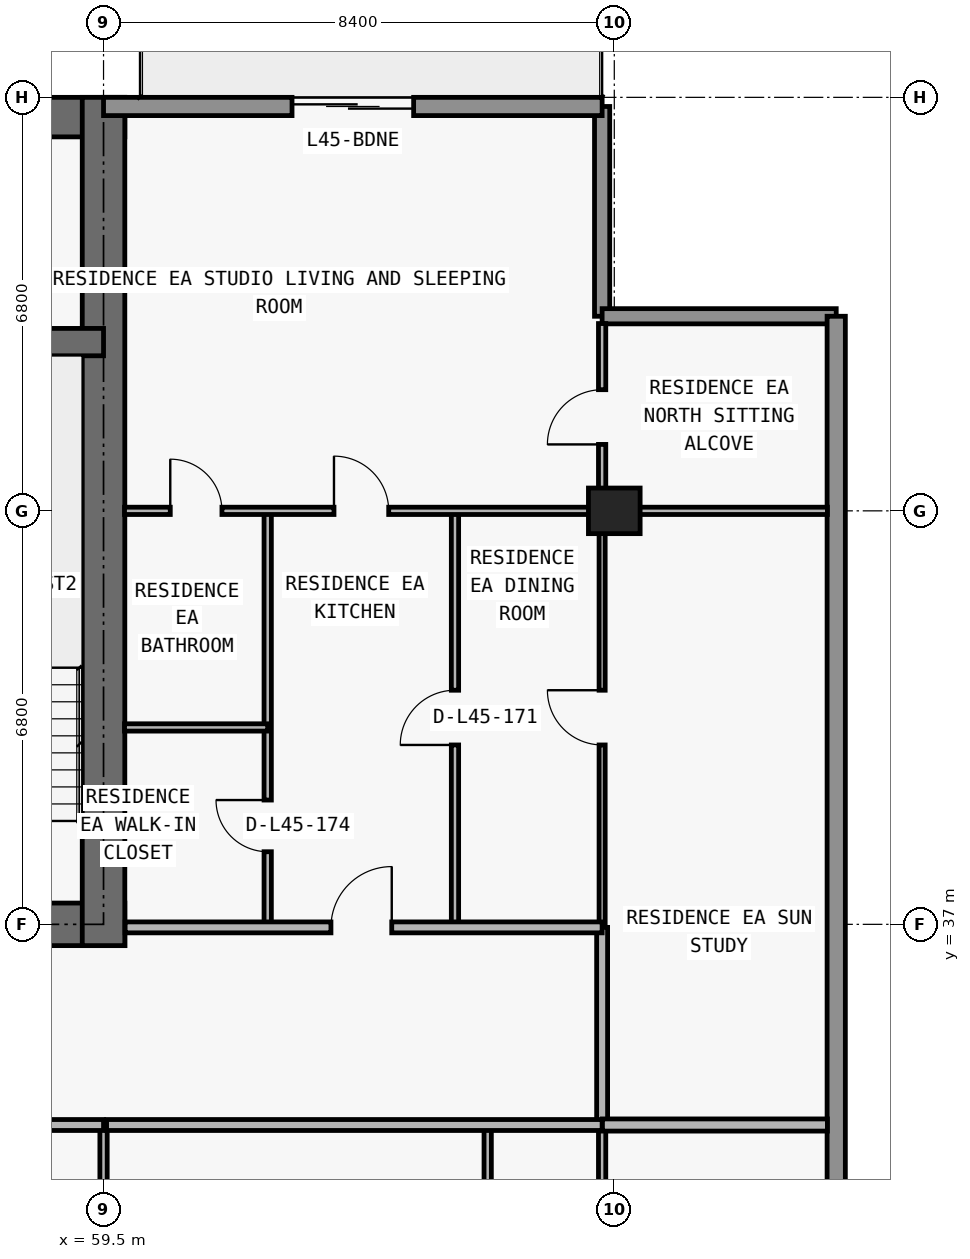
"""IFC4 building model, lengths in metres.
Left out: names, types, materials, properties, quantities, classifications, styles, units other than length and angle.
Written with IfcOpenShell. Run it as: python <this file> out.ifc"""

import sys

from ifc_helpers import new_model, si_unit, direction, frame, frame_2d, origin, origin_2d, place, context, subcontext, project, spatial, rectangle, extrude, element, fill, save


model = new_model("IFC4")
c1 = context("Model", 3, precision=1e-05, world=origin(), true_north=direction((0.0, 1.0)))
c2 = subcontext(c1, "Body", "Model", "MODEL_VIEW")
j1 = project(units=[si_unit("LENGTHUNIT", "METRE"), si_unit("PLANEANGLEUNIT", "RADIAN")], contexts=[c1])
p1 = place(None, origin())
s1 = spatial("IfcSite", under=j1, at=p1, CompositionType="ELEMENT")
p2 = place(p1, origin())
s2 = spatial("IfcBuilding", under=s1, at=p2, CompositionType="ELEMENT")
p3 = place(p2, frame((0.0, 0.0, 163.8)))
s3 = spatial("IfcBuildingStorey", under=s2, at=p3, CompositionType="ELEMENT", Elevation=163.8)
p4 = place(p3, frame((67.9, 43.8, 0.0), z_axis=(0.0, 0.0, 1.0), x_axis=(1.0, 0.0, 0.0)))
e1 = element("IfcColumn", 1, at=p4, inside=s3, PredefinedType="COLUMN", context=c2, shape_type="SweptSolid", body=[
    extrude(rectangle(XDim=0.85, YDim=0.75, at=origin_2d()), origin(), (0.0, 0.0, 1.0), 3.05),
])
p5 = place(p3, frame((17.95, 37.0, 0.0), z_axis=(0.0, 0.0, 1.0), x_axis=(1.0, 0.0, 0.0)))
e2 = element("IfcWall", 2, at=p5, inside=s3, PredefinedType="SHEAR", context=c2, shape_type="SweptSolid", body=[
    extrude(rectangle(XDim=41.9, YDim=0.7, at=frame_2d((20.95, 0.0))), origin(), (0.0, 0.0, 1.0), 3.05),
])
p6 = place(p5, frame((14.35, 0.0, 0.0)))
e3 = element("IfcOpeningElement", 3, at=p6, cuts=e2, PredefinedType="OPENING", context=c2, shape_type="SweptSolid", body=[
    extrude(rectangle(XDim=1.1, YDim=2.15, at=frame_2d((0.55, 1.075))), frame((0.0, 0.36, 0.0), z_axis=(0.0, -1.0, 0.0), x_axis=(1.0, 0.0, 0.0)), (0.0, 0.0, 1.0), 0.72),
])
p7 = place(p5, frame((6.2, 0.0, 0.0)))
e4 = element("IfcOpeningElement", 4, at=p7, cuts=e2, PredefinedType="OPENING", context=c2, shape_type="SweptSolid", body=[
    extrude(rectangle(XDim=1.05, YDim=2.15, at=frame_2d((0.525, 1.075))), frame((0.0, 0.36, 0.0), z_axis=(0.0, -1.0, 0.0), x_axis=(1.0, 0.0, 0.0)), (0.0, 0.0, 1.0), 0.72),
])
p8 = place(p5, frame((34.7, 0.0, 0.0)))
e5 = element("IfcOpeningElement", 5, at=p8, cuts=e2, PredefinedType="OPENING", context=c2, shape_type="SweptSolid", body=[
    extrude(rectangle(XDim=1.05, YDim=2.15, at=frame_2d((0.525, 1.075))), frame((0.0, 0.36, 0.0), z_axis=(0.0, -1.0, 0.0), x_axis=(1.0, 0.0, 0.0)), (0.0, 0.0, 1.0), 0.72),
])
p9 = place(p5, frame((10.812, 0.0, 0.0)))
e6 = element("IfcOpeningElement", 6, at=p9, cuts=e2, PredefinedType="OPENING", context=c2, shape_type="SweptSolid", body=[
    extrude(rectangle(XDim=1.05, YDim=2.15, at=frame_2d((0.525, 1.075))), frame((0.0, 0.36, 0.0), z_axis=(0.0, -1.0, 0.0), x_axis=(1.0, 0.0, 0.0)), (0.0, 0.0, 1.0), 0.72),
])
p10 = place(p5, frame((24.05, 0.0, 0.0)))
e7 = element("IfcOpeningElement", 7, at=p10, cuts=e2, PredefinedType="OPENING", context=c2, shape_type="SweptSolid", body=[
    extrude(rectangle(XDim=1.05, YDim=2.15, at=frame_2d((0.525, 1.075))), frame((0.0, 0.36, 0.0), z_axis=(0.0, -1.0, 0.0), x_axis=(1.0, 0.0, 0.0)), (0.0, 0.0, 1.0), 0.72),
])
p11 = place(p3, frame((17.95, 50.275, 0.0), z_axis=(0.0, 0.0, 1.0), x_axis=(1.0, 0.0, 0.0)))
e8 = element("IfcWall", 8, at=p11, inside=s3, PredefinedType="SHEAR", context=c2, shape_type="SweptSolid", body=[
    extrude(rectangle(XDim=41.9, YDim=0.65, at=frame_2d((20.95, 0.0))), origin(), (0.0, 0.0, 1.0), 3.05),
])
p12 = place(p3, frame((59.5, 36.65, 0.0), z_axis=(0.0, 0.0, 1.0), x_axis=(0.0, 1.0, 0.0)))
e9 = element("IfcWall", 9, at=p12, inside=s3, PredefinedType="SHEAR", context=c2, shape_type="SweptSolid", body=[
    extrude(rectangle(XDim=13.95, YDim=0.7, at=frame_2d((6.975, 0.0))), origin(), (0.0, 0.0, 1.0), 3.05),
])
p13 = place(p3, frame((18.3, 46.575, 0.0), z_axis=(0.0, 0.0, 1.0), x_axis=(1.0, 0.0, 0.0)))
e10 = element("IfcWall", 10, at=p13, inside=s3, PredefinedType="SHEAR", context=c2, shape_type="SweptSolid", body=[
    extrude(rectangle(XDim=41.2, YDim=0.45, at=frame_2d((20.6, 0.0))), origin(), (0.0, 0.0, 1.0), 3.05),
])
p14 = place(p13, frame((7.6, 0.0, 0.0)))
e11 = element("IfcOpeningElement", 11, at=p14, cuts=e10, PredefinedType="OPENING", context=c2, shape_type="SweptSolid", body=[
    extrude(rectangle(XDim=1.0, YDim=2.2, at=frame_2d((0.5, 1.1))), frame((0.0, 0.235, 0.0), z_axis=(0.0, -1.0, 0.0), x_axis=(1.0, 0.0, 0.0)), (0.0, 0.0, 1.0), 0.47),
])
p15 = place(p13, frame((32.625, 0.0, 0.0)))
e12 = element("IfcOpeningElement", 12, at=p15, cuts=e10, PredefinedType="OPENING", context=c2, shape_type="SweptSolid", body=[
    extrude(rectangle(XDim=1.05, YDim=2.15, at=frame_2d((0.525, 1.075))), frame((0.0, 0.235, 0.0), z_axis=(0.0, -1.0, 0.0), x_axis=(1.0, 0.0, 0.0)), (0.0, 0.0, 1.0), 0.47),
])
p16 = place(p3, frame((67.7, 50.45, 0.0), z_axis=(0.0, 0.0, 1.0), x_axis=(0.0, -1.0, 0.0)))
e13 = element("IfcWall", 13, at=p16, inside=s3, PredefinedType="ELEMENTEDWALL", context=c2, shape_type="SweptSolid", body=[
    extrude(rectangle(XDim=3.45, YDim=0.25, at=frame_2d((1.725, 0.0))), origin(), (0.0, 0.0, 1.0), 3.05),
])
p17 = place(p3, frame((67.7, 47.0, 0.0), z_axis=(0.0, 0.0, 1.0), x_axis=(1.0, 0.0, 0.0)))
e14 = element("IfcWall", 14, at=p17, inside=s3, PredefinedType="ELEMENTEDWALL", context=c2, shape_type="SweptSolid", body=[
    extrude(rectangle(XDim=3.85, YDim=0.25, at=frame_2d((1.925, 0.0))), origin(), (0.0, 0.0, 1.0), 3.05),
])
p18 = place(p3, frame((71.55, 47.0, 0.0), z_axis=(0.0, 0.0, 1.0), x_axis=(0.0, -1.0, 0.0)))
e15 = element("IfcWall", 15, at=p18, inside=s3, PredefinedType="STANDARD", context=c2, shape_type="SweptSolid", body=[
    extrude(rectangle(XDim=17.9, YDim=0.3, at=frame_2d((8.95, 0.0))), origin(), (0.0, 0.0, 1.0), 3.05),
])
p19 = place(p3, frame((59.5, 50.45, 0.0), z_axis=(0.0, 0.0, 1.0), x_axis=(1.0, 0.0, 0.0)))
e16 = element("IfcWall", 16, at=p19, inside=s3, PredefinedType="STANDARD", context=c2, shape_type="SweptSolid", body=[
    extrude(rectangle(XDim=8.2, YDim=0.3, at=frame_2d((4.1, 0.0))), origin(), (0.0, 0.0, 1.0), 3.05),
])
p20 = place(p19, frame((3.1, 0.0, 0.0)))
e17 = element("IfcOpeningElement", 17, at=p20, cuts=e16, PredefinedType="OPENING", context=c2, shape_type="SweptSolid", body=[
    extrude(rectangle(XDim=2.0, YDim=2.3, at=frame_2d((1.0, 1.15))), frame((0.0, 0.16, 0.0), z_axis=(0.0, -1.0, 0.0), x_axis=(1.0, 0.0, 0.0)), (0.0, 0.0, 1.0), 0.32),
])
p21 = place(p3, frame((59.5, 29.44, 0.0), z_axis=(0.0, 0.0, 1.0), x_axis=(0.0, 1.0, 0.0)))
e18 = element("IfcWall", 18, at=p21, inside=s3, PredefinedType="PARTITIONING", context=c2, shape_type="SweptSolid", body=[
    extrude(rectangle(XDim=4.26, YDim=0.12, at=frame_2d((2.13, 0.0))), origin(), (0.0, 0.0, 1.0), 2.263),
])
p22 = place(p3, frame((62.2, 37.0, 0.0), z_axis=(0.0, 0.0, 1.0), x_axis=(0.0, 1.0, 0.0)))
e19 = element("IfcWall", 19, at=p22, inside=s3, PredefinedType="PARTITIONING", context=c2, shape_type="SweptSolid", body=[
    extrude(rectangle(XDim=6.8, YDim=0.12, at=frame_2d((3.4, 0.0))), origin(), (0.0, 0.0, 1.0), 3.05),
])
p23 = place(p22, frame((1.194, 0.0, 0.0)))
e20 = element("IfcOpeningElement", 20, at=p23, cuts=e19, PredefinedType="OPENING", context=c2, shape_type="SweptSolid", body=[
    extrude(rectangle(XDim=0.85, YDim=2.1, at=frame_2d((0.425, 1.05))), frame((0.0, 0.07, 0.0), z_axis=(0.0, -1.0, 0.0), x_axis=(1.0, 0.0, 0.0)), (0.0, 0.0, 1.0), 0.14),
])
p24 = place(p3, frame((65.28, 37.0, 0.0), z_axis=(0.0, 0.0, 1.0), x_axis=(0.0, 1.0, 0.0)))
e21 = element("IfcWall", 21, at=p24, inside=s3, PredefinedType="PARTITIONING", context=c2, shape_type="SweptSolid", body=[
    extrude(rectangle(XDim=6.8, YDim=0.12, at=frame_2d((3.4, 0.0))), origin(), (0.0, 0.0, 1.0), 3.05),
])
p25 = place(p24, frame((2.95, 0.0, 0.0)))
e22 = element("IfcOpeningElement", 22, at=p25, cuts=e21, PredefinedType="OPENING", context=c2, shape_type="SweptSolid", body=[
    extrude(rectangle(XDim=0.9, YDim=2.15, at=frame_2d((0.45, 1.075))), frame((0.0, 0.07, 0.0), z_axis=(0.0, -1.0, 0.0), x_axis=(1.0, 0.0, 0.0)), (0.0, 0.0, 1.0), 0.14),
])
p26 = place(p3, frame((65.818, 29.44, 0.0), z_axis=(0.0, 0.0, 1.0), x_axis=(0.0, 1.0, 0.0)))
e23 = element("IfcWall", 23, at=p26, inside=s3, PredefinedType="PARTITIONING", context=c2, shape_type="SweptSolid", body=[
    extrude(rectangle(XDim=4.26, YDim=0.12, at=frame_2d((2.13, 0.0))), origin(), (0.0, 0.0, 1.0), 2.725),
])
p27 = place(p26, frame((1.705, 0.0, 0.0)))
e24 = element("IfcOpeningElement", 24, at=p27, cuts=e23, PredefinedType="OPENING", context=c2, shape_type="SweptSolid", body=[
    extrude(rectangle(XDim=0.85, YDim=2.1, at=frame_2d((0.425, 1.05))), frame((0.0, 0.07, 0.0), z_axis=(0.0, -1.0, 0.0), x_axis=(1.0, 0.0, 0.0)), (0.0, 0.0, 1.0), 0.14),
])
p28 = place(p3, frame((67.7, 29.44, 0.0), z_axis=(0.0, 0.0, 1.0), x_axis=(0.0, 1.0, 0.0)))
e25 = element("IfcWall", 25, at=p28, inside=s3, PredefinedType="PARTITIONING", context=c2, shape_type="SweptSolid", body=[
    extrude(rectangle(XDim=4.26, YDim=0.12, at=frame_2d((2.13, 0.0))), origin(), (0.0, 0.0, 1.0), 2.263),
])
p29 = place(p3, frame((67.7, 33.705, 0.0), z_axis=(0.0, 0.0, 1.0), x_axis=(0.0, 1.0, 0.0)))
e26 = element("IfcWall", 26, at=p29, inside=s3, PredefinedType="PARTITIONING", context=c2, shape_type="SweptSolid", body=[
    extrude(rectangle(XDim=3.245, YDim=0.18, at=frame_2d((1.623, 0.0))), origin(), (0.0, 0.0, 1.0), 2.263),
])
p30 = place(p3, frame((67.7, 37.0, 0.0), z_axis=(0.0, 0.0, 1.0), x_axis=(0.0, 1.0, 0.0)))
e27 = element("IfcWall", 27, at=p30, inside=s3, PredefinedType="MOVABLE", context=c2, shape_type="SweptSolid", body=[
    extrude(rectangle(XDim=6.8, YDim=0.1, at=frame_2d((3.4, 0.0))), origin(), (0.0, 0.0, 1.0), 2.263),
])
p31 = place(p30, frame((2.95, 0.0, 0.0)))
e28 = element("IfcOpeningElement", 28, at=p31, cuts=e27, PredefinedType="OPENING", context=c2, shape_type="SweptSolid", body=[
    extrude(rectangle(XDim=0.9, YDim=2.15, at=frame_2d((0.45, 1.075))), frame((0.0, 0.06, 0.0), z_axis=(0.0, -1.0, 0.0), x_axis=(1.0, 0.0, 0.0)), (0.0, 0.0, 1.0), 0.12),
])
p32 = place(p3, frame((67.7, 43.805, 0.0), z_axis=(0.0, 0.0, 1.0), x_axis=(0.0, 1.0, 0.0)))
e29 = element("IfcWall", 29, at=p32, inside=s3, PredefinedType="PARTITIONING", context=c2, shape_type="SweptSolid", body=[
    extrude(rectangle(XDim=3.075, YDim=0.12, at=frame_2d((1.538, 0.0))), origin(), (0.0, 0.0, 1.0), 3.05),
])
p33 = place(p32, frame((1.087, 0.0, 0.0)))
e30 = element("IfcOpeningElement", 30, at=p33, cuts=e29, PredefinedType="OPENING", context=c2, shape_type="SweptSolid", body=[
    extrude(rectangle(XDim=0.9, YDim=2.15, at=frame_2d((0.45, 1.075))), frame((0.0, 0.07, 0.0), z_axis=(0.0, -1.0, 0.0), x_axis=(1.0, 0.0, 0.0)), (0.0, 0.0, 1.0), 0.14),
])
p34 = place(p3, frame((38.75, 33.7, 0.0), z_axis=(0.0, 0.0, 1.0), x_axis=(1.0, 0.0, 0.0)))
e31 = element("IfcWall", 31, at=p34, inside=s3, PredefinedType="PARTITIONING", context=c2, shape_type="SweptSolid", body=[
    extrude(rectangle(XDim=20.75, YDim=0.18, at=frame_2d((10.375, 0.0))), origin(), (0.0, 0.0, 1.0), 3.05),
])
p35 = place(p34, frame((6.474, 0.0, 0.0)))
e32 = element("IfcOpeningElement", 32, at=p35, cuts=e31, PredefinedType="OPENING", context=c2, shape_type="SweptSolid", body=[
    extrude(rectangle(XDim=1.0, YDim=2.2, at=frame_2d((0.5, 1.1))), frame((0.0, 0.1, 0.0), z_axis=(0.0, -1.0, 0.0), x_axis=(1.0, 0.0, 0.0)), (0.0, 0.0, 1.0), 0.2),
])
p36 = place(p34, frame((14.999, 0.0, 0.0)))
e33 = element("IfcOpeningElement", 33, at=p36, cuts=e31, PredefinedType="OPENING", context=c2, shape_type="SweptSolid", body=[
    extrude(rectangle(XDim=1.0, YDim=2.2, at=frame_2d((0.5, 1.1))), frame((0.0, 0.1, 0.0), z_axis=(0.0, -1.0, 0.0), x_axis=(1.0, 0.0, 0.0)), (0.0, 0.0, 1.0), 0.2),
])
p37 = place(p3, frame((59.55, 33.7, 0.0), z_axis=(0.0, 0.0, 1.0), x_axis=(1.0, 0.0, 0.0)))
e34 = element("IfcWall", 34, at=p37, inside=s3, PredefinedType="PARTITIONING", context=c2, shape_type="SweptSolid", body=[
    extrude(rectangle(XDim=8.15, YDim=0.18, at=frame_2d((4.075, 0.0))), origin(), (0.0, 0.0, 1.0), 3.05),
])
p38 = place(p3, frame((67.705, 33.7, 0.0), z_axis=(0.0, 0.0, 1.0), x_axis=(1.0, 0.0, 0.0)))
e35 = element("IfcWall", 35, at=p38, inside=s3, PredefinedType="PARTITIONING", context=c2, shape_type="SweptSolid", body=[
    extrude(rectangle(XDim=3.7, YDim=0.2, at=frame_2d((1.85, 0.0))), origin(), (0.0, 0.0, 1.0), 3.05),
])
p39 = place(p3, frame((59.855, 36.95, 0.0), z_axis=(0.0, 0.0, 1.0), x_axis=(1.0, 0.0, 0.0)))
e36 = element("IfcWall", 36, at=p39, inside=s3, PredefinedType="PARTITIONING", context=c2, shape_type="SweptSolid", body=[
    extrude(rectangle(XDim=7.845, YDim=0.18, at=frame_2d((3.922, 0.0))), origin(), (0.0, 0.0, 1.0), 3.05),
])
p40 = place(p39, frame((3.385, 0.0, 0.0)))
e37 = element("IfcOpeningElement", 37, at=p40, cuts=e36, PredefinedType="OPENING", context=c2, shape_type="SweptSolid", body=[
    extrude(rectangle(XDim=1.0, YDim=2.2, at=frame_2d((0.5, 1.1))), frame((0.0, 0.1, 0.0), z_axis=(0.0, -1.0, 0.0), x_axis=(1.0, 0.0, 0.0)), (0.0, 0.0, 1.0), 0.2),
])
p41 = place(p3, frame((59.845, 40.238, 0.0), z_axis=(0.0, 0.0, 1.0), x_axis=(1.0, 0.0, 0.0)))
e38 = element("IfcWall", 38, at=p41, inside=s3, PredefinedType="PARTITIONING", context=c2, shape_type="SweptSolid", body=[
    extrude(rectangle(XDim=2.355, YDim=0.12, at=frame_2d((1.177, 0.0))), origin(), (0.0, 0.0, 1.0), 3.05),
])
p42 = place(p3, frame((59.845, 43.8, 0.0), z_axis=(0.0, 0.0, 1.0), x_axis=(1.0, 0.0, 0.0)))
e39 = element("IfcWall", 39, at=p42, inside=s3, PredefinedType="PARTITIONING", context=c2, shape_type="SweptSolid", body=[
    extrude(rectangle(XDim=11.56, YDim=0.12, at=frame_2d((5.78, 0.0))), origin(), (0.0, 0.0, 1.0), 2.418),
])
p43 = place(p42, frame((3.445, 0.0, 0.0)))
e40 = element("IfcOpeningElement", 40, at=p43, cuts=e39, PredefinedType="OPENING", context=c2, shape_type="SweptSolid", body=[
    extrude(rectangle(XDim=0.9, YDim=2.15, at=frame_2d((0.45, 1.075))), frame((0.0, 0.07, 0.0), z_axis=(0.0, -1.0, 0.0), x_axis=(1.0, 0.0, 0.0)), (0.0, 0.0, 1.0), 0.14),
])
p44 = place(p42, frame((0.752, 0.0, 0.0)))
e41 = element("IfcOpeningElement", 41, at=p44, cuts=e39, PredefinedType="OPENING", context=c2, shape_type="SweptSolid", body=[
    extrude(rectangle(XDim=0.85, YDim=2.1, at=frame_2d((0.425, 1.05))), frame((0.0, 0.07, 0.0), z_axis=(0.0, -1.0, 0.0), x_axis=(1.0, 0.0, 0.0)), (0.0, 0.0, 1.0), 0.14),
])
p45 = place(p20, origin())
e42 = element("IfcDoor", 42, at=p45, inside=s3, OperationType="DOUBLE_DOOR_SLIDING", PredefinedType="DOOR", context=c2, shape_type="SweptSolid", body=[
    extrude(rectangle(XDim=2.0, YDim=2.3, at=frame_2d((1.0, 1.15))), frame((0.0, 0.025, 0.0), z_axis=(0.0, -1.0, 0.0), x_axis=(1.0, 0.0, 0.0)), (0.0, 0.0, 1.0), 0.05),
])
fill(e17, e42)
p46 = place(p25, origin())
e43 = element("IfcDoor", 43, at=p46, inside=s3, OperationType="SINGLE_SWING_LEFT", PredefinedType="DOOR", context=c2, shape_type="SweptSolid", body=[
    extrude(rectangle(XDim=0.9, YDim=2.15, at=frame_2d((0.45, 1.075))), frame((0.0, 0.025, 0.0), z_axis=(0.0, -1.0, 0.0), x_axis=(1.0, 0.0, 0.0)), (0.0, 0.0, 1.0), 0.05),
])
fill(e22, e43)
p47 = place(p40, origin())
e44 = element("IfcDoor", 44, at=p47, inside=s3, OperationType="SINGLE_SWING_RIGHT", PredefinedType="DOOR", context=c2, shape_type="SweptSolid", body=[
    extrude(rectangle(XDim=1.0, YDim=2.2, at=frame_2d((0.5, 1.1))), frame((0.0, 0.025, 0.0), z_axis=(0.0, -1.0, 0.0), x_axis=(1.0, 0.0, 0.0)), (0.0, 0.0, 1.0), 0.05),
])
fill(e37, e44)
p48 = place(p43, origin())
e45 = element("IfcDoor", 45, at=p48, inside=s3, OperationType="SINGLE_SWING_LEFT", PredefinedType="DOOR", context=c2, shape_type="SweptSolid", body=[
    extrude(rectangle(XDim=0.9, YDim=2.15, at=frame_2d((0.45, 1.075))), frame((0.0, 0.025, 0.0), z_axis=(0.0, -1.0, 0.0), x_axis=(1.0, 0.0, 0.0)), (0.0, 0.0, 1.0), 0.05),
])
fill(e40, e45)
p49 = place(p23, origin())
e46 = element("IfcDoor", 46, at=p49, inside=s3, OperationType="SINGLE_SWING_RIGHT", PredefinedType="DOOR", context=c2, shape_type="SweptSolid", body=[
    extrude(rectangle(XDim=0.85, YDim=2.1, at=frame_2d((0.425, 1.05))), frame((0.0, 0.025, 0.0), z_axis=(0.0, -1.0, 0.0), x_axis=(1.0, 0.0, 0.0)), (0.0, 0.0, 1.0), 0.05),
])
fill(e20, e46)
p50 = place(p44, origin())
e47 = element("IfcDoor", 47, at=p50, inside=s3, OperationType="SINGLE_SWING_LEFT", PredefinedType="DOOR", context=c2, shape_type="SweptSolid", body=[
    extrude(rectangle(XDim=0.85, YDim=2.1, at=frame_2d((0.425, 1.05))), frame((0.0, 0.025, 0.0), z_axis=(0.0, -1.0, 0.0), x_axis=(1.0, 0.0, 0.0)), (0.0, 0.0, 1.0), 0.05),
])
fill(e41, e47)
p51 = place(p31, origin())
e48 = element("IfcDoor", 48, at=p51, inside=s3, OperationType="SINGLE_SWING_RIGHT", PredefinedType="DOOR", context=c2, shape_type="SweptSolid", body=[
    extrude(rectangle(XDim=0.9, YDim=2.15, at=frame_2d((0.45, 1.075))), frame((0.0, 0.025, 0.0), z_axis=(0.0, -1.0, 0.0), x_axis=(1.0, 0.0, 0.0)), (0.0, 0.0, 1.0), 0.05),
])
fill(e28, e48)
p52 = place(p33, origin())
e49 = element("IfcDoor", 49, at=p52, inside=s3, OperationType="SINGLE_SWING_LEFT", PredefinedType="DOOR", context=c2, shape_type="SweptSolid", body=[
    extrude(rectangle(XDim=0.9, YDim=2.15, at=frame_2d((0.45, 1.075))), frame((0.0, 0.025, 0.0), z_axis=(0.0, -1.0, 0.0), x_axis=(1.0, 0.0, 0.0)), (0.0, 0.0, 1.0), 0.05),
])
fill(e30, e49)
save(model, sys.argv[1])
